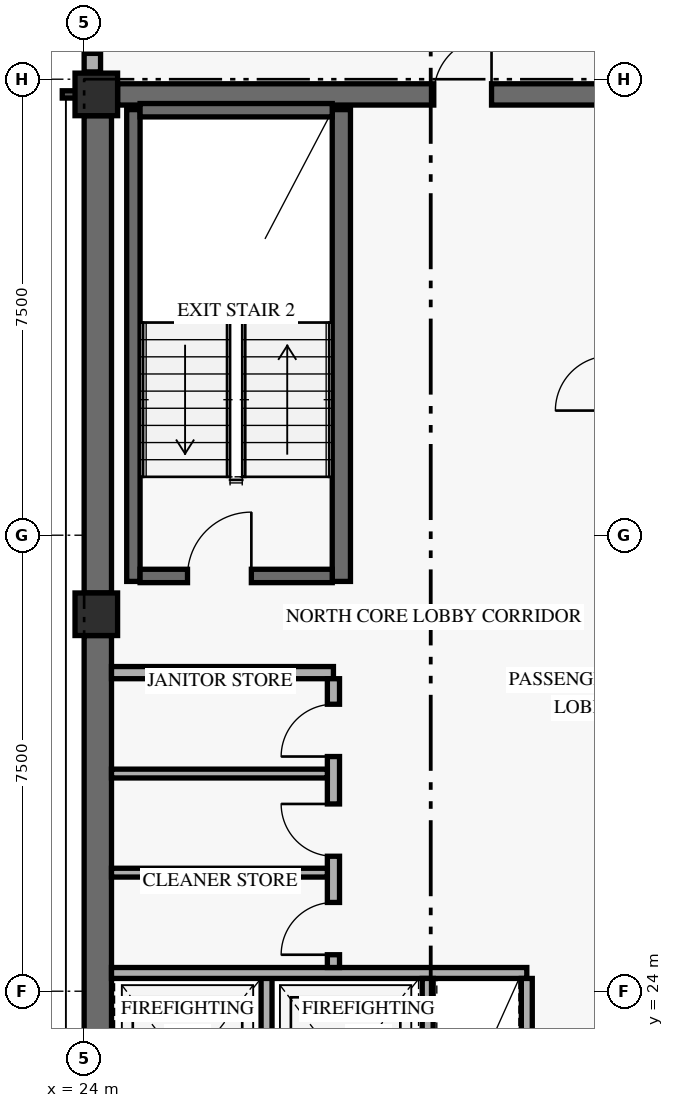
"""IFC4 building model, lengths in metres.
Left out: names, types, materials, properties, quantities, classifications, styles, units other than length and angle.
Written with IfcOpenShell. Run it as: python <this file> out.ifc"""

import sys

from ifc_helpers import new_model, si_unit, direction, frame, frame_2d, origin, origin_2d, place, context, subcontext, project, spatial, rectangle, extrude, element, fill, save


model = new_model("IFC4")
c1 = context("Model", 3, precision=1e-05, world=origin(), true_north=direction((0.0, 1.0)))
c2 = subcontext(c1, "Body", "Model", "MODEL_VIEW")
j1 = project(units=[si_unit("LENGTHUNIT", "METRE"), si_unit("PLANEANGLEUNIT", "RADIAN")], contexts=[c1])
p1 = place(None, origin())
s1 = spatial("IfcSite", under=j1, at=p1, CompositionType="ELEMENT")
p2 = place(p1, origin())
s2 = spatial("IfcBuilding", under=s1, at=p2, CompositionType="ELEMENT")
p3 = place(p2, frame((0.0, 0.0, 267.6)))
s3 = spatial("IfcBuildingStorey", under=s2, at=p3, CompositionType="ELEMENT", Elevation=267.6)
p4 = place(p3, frame((24.225, 17.9, 0.0), z_axis=(0.0, 0.0, 1.0), x_axis=(0.0, 1.0, 0.0)))
e1 = element("IfcWall", 1, at=p4, inside=s3, PredefinedType="SHEAR", context=c2, shape_type="SweptSolid", body=[
    extrude(rectangle(XDim=11.95, YDim=0.45, at=frame_2d((5.975, 0.0))), origin(), (0.0, 0.0, 1.0), 2.821),
])
p5 = place(p3, frame((24.225, 30.55, 0.0), z_axis=(0.0, 0.0, 1.0), x_axis=(0.0, 1.0, 0.0)))
e2 = element("IfcWall", 2, at=p5, inside=s3, PredefinedType="SHEAR", context=c2, shape_type="SweptSolid", body=[
    extrude(rectangle(XDim=7.85, YDim=0.45, at=frame_2d((3.925, 0.0))), origin(), (0.0, 0.0, 1.0), 2.821),
])
p6 = place(p3, frame((24.55, 38.75, 0.0), z_axis=(0.0, 0.0, 1.0), x_axis=(1.0, 0.0, 0.0)))
e3 = element("IfcWall", 3, at=p6, inside=s3, PredefinedType="SHEAR", context=c2, shape_type="SweptSolid", body=[
    extrude(rectangle(XDim=10.3, YDim=0.35, at=frame_2d((5.15, 0.0))), origin(), (0.0, 0.0, 1.0), 3.36),
])
p7 = place(p6, frame((5.2, 0.0, 0.0)))
e4 = element("IfcOpeningElement", 4, at=p7, cuts=e3, PredefinedType="OPENING", context=c2, shape_type="SweptSolid", body=[
    extrude(rectangle(XDim=0.95, YDim=2.15, at=frame_2d((0.475, 1.075))), frame((0.0, 0.185, 0.0), z_axis=(0.0, -1.0, 0.0), x_axis=(1.0, 0.0, 0.0)), (0.0, 0.0, 1.0), 0.37),
])
p8 = place(p3, frame((24.81, 30.74, 0.0), z_axis=(0.0, 0.0, 1.0), x_axis=(0.0, 1.0, 0.0)))
e5 = element("IfcWall", 5, at=p8, inside=s3, PredefinedType="SHEAR", context=c2, shape_type="SweptSolid", body=[
    extrude(rectangle(XDim=7.76, YDim=0.22, at=frame_2d((3.88, 0.0))), origin(), (0.0, 0.0, 1.0), 3.36),
])
p9 = place(p3, frame((28.23, 30.74, 0.0), z_axis=(0.0, 0.0, 1.0), x_axis=(0.0, 1.0, 0.0)))
e6 = element("IfcWall", 6, at=p9, inside=s3, PredefinedType="SHEAR", context=c2, shape_type="SweptSolid", body=[
    extrude(rectangle(XDim=7.76, YDim=0.3, at=frame_2d((3.88, 0.0))), origin(), (0.0, 0.0, 1.0), 3.36),
])
p10 = place(p3, frame((24.92, 30.83, 0.0), z_axis=(0.0, 0.0, 1.0), x_axis=(1.0, 0.0, 0.0)))
e7 = element("IfcWall", 7, at=p10, inside=s3, PredefinedType="SHEAR", context=c2, shape_type="SweptSolid", body=[
    extrude(rectangle(XDim=3.16, YDim=0.22, at=frame_2d((1.58, 0.0))), origin(), (0.0, 0.0, 1.0), 3.36),
])
p11 = place(p10, frame((0.78, 0.0, 0.0)))
e8 = element("IfcOpeningElement", 8, at=p11, cuts=e7, PredefinedType="OPENING", context=c2, shape_type="SweptSolid", body=[
    extrude(rectangle(XDim=1.05, YDim=2.15, at=frame_2d((0.525, 1.075))), frame((0.0, 0.12, 0.0), z_axis=(0.0, -1.0, 0.0), x_axis=(1.0, 0.0, 0.0)), (0.0, 0.0, 1.0), 0.24),
])
p12 = place(p3, frame((24.92, 38.49, 0.0), z_axis=(0.0, 0.0, 1.0), x_axis=(1.0, 0.0, 0.0)))
e9 = element("IfcWall", 9, at=p12, inside=s3, PredefinedType="SHEAR", context=c2, shape_type="SweptSolid", body=[
    extrude(rectangle(XDim=3.16, YDim=0.22, at=frame_2d((1.58, 0.0))), origin(), (0.0, 0.0, 1.0), 3.36),
])
for number, where, z_axis, x_axis in (
    (10, (24.2, 30.2, 0.0), (0.0, 0.0, 1.0), (1.0, 0.0, 0.0)),
    (11, (24.2, 38.75, 0.0), (0.0, 0.0, 1.0), (1.0, 0.0, 0.0)),
):
    element("IfcColumn", number, at=place(p3, frame(where, z_axis=z_axis, x_axis=x_axis)), inside=s3, PredefinedType="COLUMN", context=c2, shape_type="SweptSolid", body=[
        extrude(rectangle(XDim=0.7, YDim=0.7, at=origin_2d()), origin(), (0.0, 0.0, 1.0), 3.6),
    ])
p13 = place(p3, frame((24.135, 39.12, 0.0), z_axis=(0.0, 0.0, 1.0), x_axis=(0.0, 1.0, 0.0)))
e12 = element("IfcWall", 12, at=p13, inside=s3, PredefinedType="SOLIDWALL", context=c2, shape_type="SweptSolid", body=[
    extrude(rectangle(XDim=1.56, YDim=0.27, at=frame_2d((0.78, 0.0))), origin(), (0.0, 0.0, 1.0), 2.803),
])
p14 = place(p13, frame((0.305, 0.0, 0.85)))
e13 = element("IfcOpeningElement", 13, at=p14, cuts=e12, PredefinedType="OPENING", context=c2, shape_type="SweptSolid", body=[
    extrude(rectangle(XDim=0.95, YDim=1.5, at=frame_2d((0.475, 0.75))), frame((0.0, 0.145, 0.0), z_axis=(0.0, -1.0, 0.0), x_axis=(1.0, 0.0, 0.0)), (0.0, 0.0, 1.0), 0.29),
])
p15 = place(p3, frame((27.0, 21.19, 0.0), z_axis=(0.0, 0.0, 1.0), x_axis=(0.0, 1.0, 0.0)))
e14 = element("IfcWall", 14, at=p15, inside=s3, PredefinedType="STANDARD", context=c2, shape_type="SweptSolid", body=[
    extrude(rectangle(XDim=3.11, YDim=0.18, at=frame_2d((1.555, 0.0))), origin(), (0.0, 0.0, 1.0), 3.36),
])
p16 = place(p3, frame((24.45, 24.3, 0.0), z_axis=(0.0, 0.0, 1.0), x_axis=(1.0, 0.0, 0.0)))
e15 = element("IfcWall", 15, at=p16, inside=s3, PredefinedType="STANDARD", context=c2, shape_type="SweptSolid", body=[
    extrude(rectangle(XDim=6.83, YDim=0.18, at=frame_2d((3.415, 0.0))), origin(), (0.0, 0.0, 1.0), 3.36),
])
for number, where, z_axis, x_axis in (
    (16, (29.65, 21.19, 0.0), (0.0, 0.0, 1.0), (0.0, 1.0, 0.0)),
    (17, (31.28, 21.19, 0.0), (0.0, 0.0, 1.0), (0.0, 1.0, 0.0)),
):
    element("IfcWall", number, at=place(p3, frame(where, z_axis=z_axis, x_axis=x_axis)), inside=s3, PredefinedType="STANDARD", context=c2, shape_type="SweptSolid", body=[
        extrude(rectangle(XDim=3.02, YDim=0.18, at=frame_2d((1.51, 0.0))), origin(), (0.0, 0.0, 1.0), 3.36),
    ])
p17 = place(p3, frame((24.45, 29.24, 0.0), z_axis=(0.0, 0.0, 1.0), x_axis=(1.0, 0.0, 0.0)))
e18 = element("IfcWall", 18, at=p17, inside=s3, PredefinedType="STANDARD", context=c2, shape_type="SweptSolid", body=[
    extrude(rectangle(XDim=3.65, YDim=0.2, at=frame_2d((1.825, 0.0))), origin(), (0.0, 0.0, 1.0), 3.36),
])
p18 = place(p3, frame((28.1, 24.39, 0.0), z_axis=(0.0, 0.0, 1.0), x_axis=(0.0, 1.0, 0.0)))
e19 = element("IfcWall", 19, at=p18, inside=s3, PredefinedType="STANDARD", context=c2, shape_type="SweptSolid", body=[
    extrude(rectangle(XDim=4.75, YDim=0.2, at=frame_2d((2.375, 0.0))), origin(), (0.0, 0.0, 1.0), 3.36),
])
p19 = place(p18, frame((0.21, 0.0, 0.0)))
e20 = element("IfcOpeningElement", 20, at=p19, cuts=e19, PredefinedType="OPENING", context=c2, shape_type="SweptSolid", body=[
    extrude(rectangle(XDim=0.86, YDim=2.1, at=frame_2d((0.43, 1.05))), frame((0.0, 0.11, 0.0), z_axis=(0.0, -1.0, 0.0), x_axis=(1.0, 0.0, 0.0)), (0.0, 0.0, 1.0), 0.22),
])
p20 = place(p18, frame((1.83, 0.0, 0.0)))
e21 = element("IfcOpeningElement", 21, at=p20, cuts=e19, PredefinedType="OPENING", context=c2, shape_type="SweptSolid", body=[
    extrude(rectangle(XDim=0.86, YDim=2.1, at=frame_2d((0.43, 1.05))), frame((0.0, 0.11, 0.0), z_axis=(0.0, -1.0, 0.0), x_axis=(1.0, 0.0, 0.0)), (0.0, 0.0, 1.0), 0.22),
])
p21 = place(p18, frame((3.47, 0.0, 0.0)))
e22 = element("IfcOpeningElement", 22, at=p21, cuts=e19, PredefinedType="OPENING", context=c2, shape_type="SweptSolid", body=[
    extrude(rectangle(XDim=0.86, YDim=2.1, at=frame_2d((0.43, 1.05))), frame((0.0, 0.11, 0.0), z_axis=(0.0, -1.0, 0.0), x_axis=(1.0, 0.0, 0.0)), (0.0, 0.0, 1.0), 0.22),
])
for number, where, z_axis, x_axis in (
    (23, (24.45, 25.95, 0.0), (0.0, 0.0, 1.0), (1.0, 0.0, 0.0)),
    (24, (24.45, 27.58, 0.0), (0.0, 0.0, 1.0), (1.0, 0.0, 0.0)),
):
    element("IfcWall", number, at=place(p3, frame(where, z_axis=z_axis, x_axis=x_axis)), inside=s3, PredefinedType="PARTITIONING", context=c2, shape_type="SweptSolid", body=[
        extrude(rectangle(XDim=3.55, YDim=0.145, at=frame_2d((1.775, 0.0))), origin(), (0.0, 0.0, 1.0), 3.36),
    ])
p22 = place(p14, origin())
e25 = element("IfcWindow", 25, at=p22, inside=s3, PartitioningType="SINGLE_PANEL", PredefinedType="WINDOW", context=c2, shape_type="SweptSolid", body=[
    extrude(rectangle(XDim=0.95, YDim=1.5, at=frame_2d((0.475, 0.75))), frame((0.0, 0.03, 0.0), z_axis=(0.0, -1.0, 0.0), x_axis=(1.0, 0.0, 0.0)), (0.0, 0.0, 1.0), 0.06),
])
fill(e13, e25)
p23 = place(p11, origin())
e26 = element("IfcDoor", 26, at=p23, inside=s3, OperationType="SINGLE_SWING_RIGHT", PredefinedType="DOOR", context=c2, shape_type="SweptSolid", body=[
    extrude(rectangle(XDim=1.05, YDim=2.15, at=frame_2d((0.525, 1.075))), frame((0.0, 0.025, 0.0), z_axis=(0.0, -1.0, 0.0), x_axis=(1.0, 0.0, 0.0)), (0.0, 0.0, 1.0), 0.05),
])
fill(e8, e26)
p24 = place(p19, origin())
e27 = element("IfcDoor", 27, at=p24, inside=s3, OperationType="SINGLE_SWING_LEFT", PredefinedType="DOOR", context=c2, shape_type="SweptSolid", body=[
    extrude(rectangle(XDim=0.86, YDim=2.1, at=frame_2d((0.43, 1.05))), frame((0.0, 0.025, 0.0), z_axis=(0.0, -1.0, 0.0), x_axis=(1.0, 0.0, 0.0)), (0.0, 0.0, 1.0), 0.05),
])
fill(e20, e27)
p25 = place(p20, origin())
e28 = element("IfcDoor", 28, at=p25, inside=s3, OperationType="SINGLE_SWING_RIGHT", PredefinedType="DOOR", context=c2, shape_type="SweptSolid", body=[
    extrude(rectangle(XDim=0.86, YDim=2.1, at=frame_2d((0.43, 1.05))), frame((0.0, 0.025, 0.0), z_axis=(0.0, -1.0, 0.0), x_axis=(1.0, 0.0, 0.0)), (0.0, 0.0, 1.0), 0.05),
])
fill(e21, e28)
p26 = place(p21, origin())
e29 = element("IfcDoor", 29, at=p26, inside=s3, OperationType="SINGLE_SWING_LEFT", PredefinedType="DOOR", context=c2, shape_type="SweptSolid", body=[
    extrude(rectangle(XDim=0.86, YDim=2.1, at=frame_2d((0.43, 1.05))), frame((0.0, 0.025, 0.0), z_axis=(0.0, -1.0, 0.0), x_axis=(1.0, 0.0, 0.0)), (0.0, 0.0, 1.0), 0.05),
])
fill(e22, e29)
p27 = place(p7, origin())
e30 = element("IfcDoor", 30, at=p27, inside=s3, OperationType="SINGLE_SWING_RIGHT", PredefinedType="DOOR", context=c2, shape_type="SweptSolid", body=[
    extrude(rectangle(XDim=0.95, YDim=2.15, at=frame_2d((0.475, 1.075))), frame((0.0, 0.025, 0.0), z_axis=(0.0, -1.0, 0.0), x_axis=(1.0, 0.0, 0.0)), (0.0, 0.0, 1.0), 0.05),
])
fill(e4, e30)
save(model, sys.argv[1])
